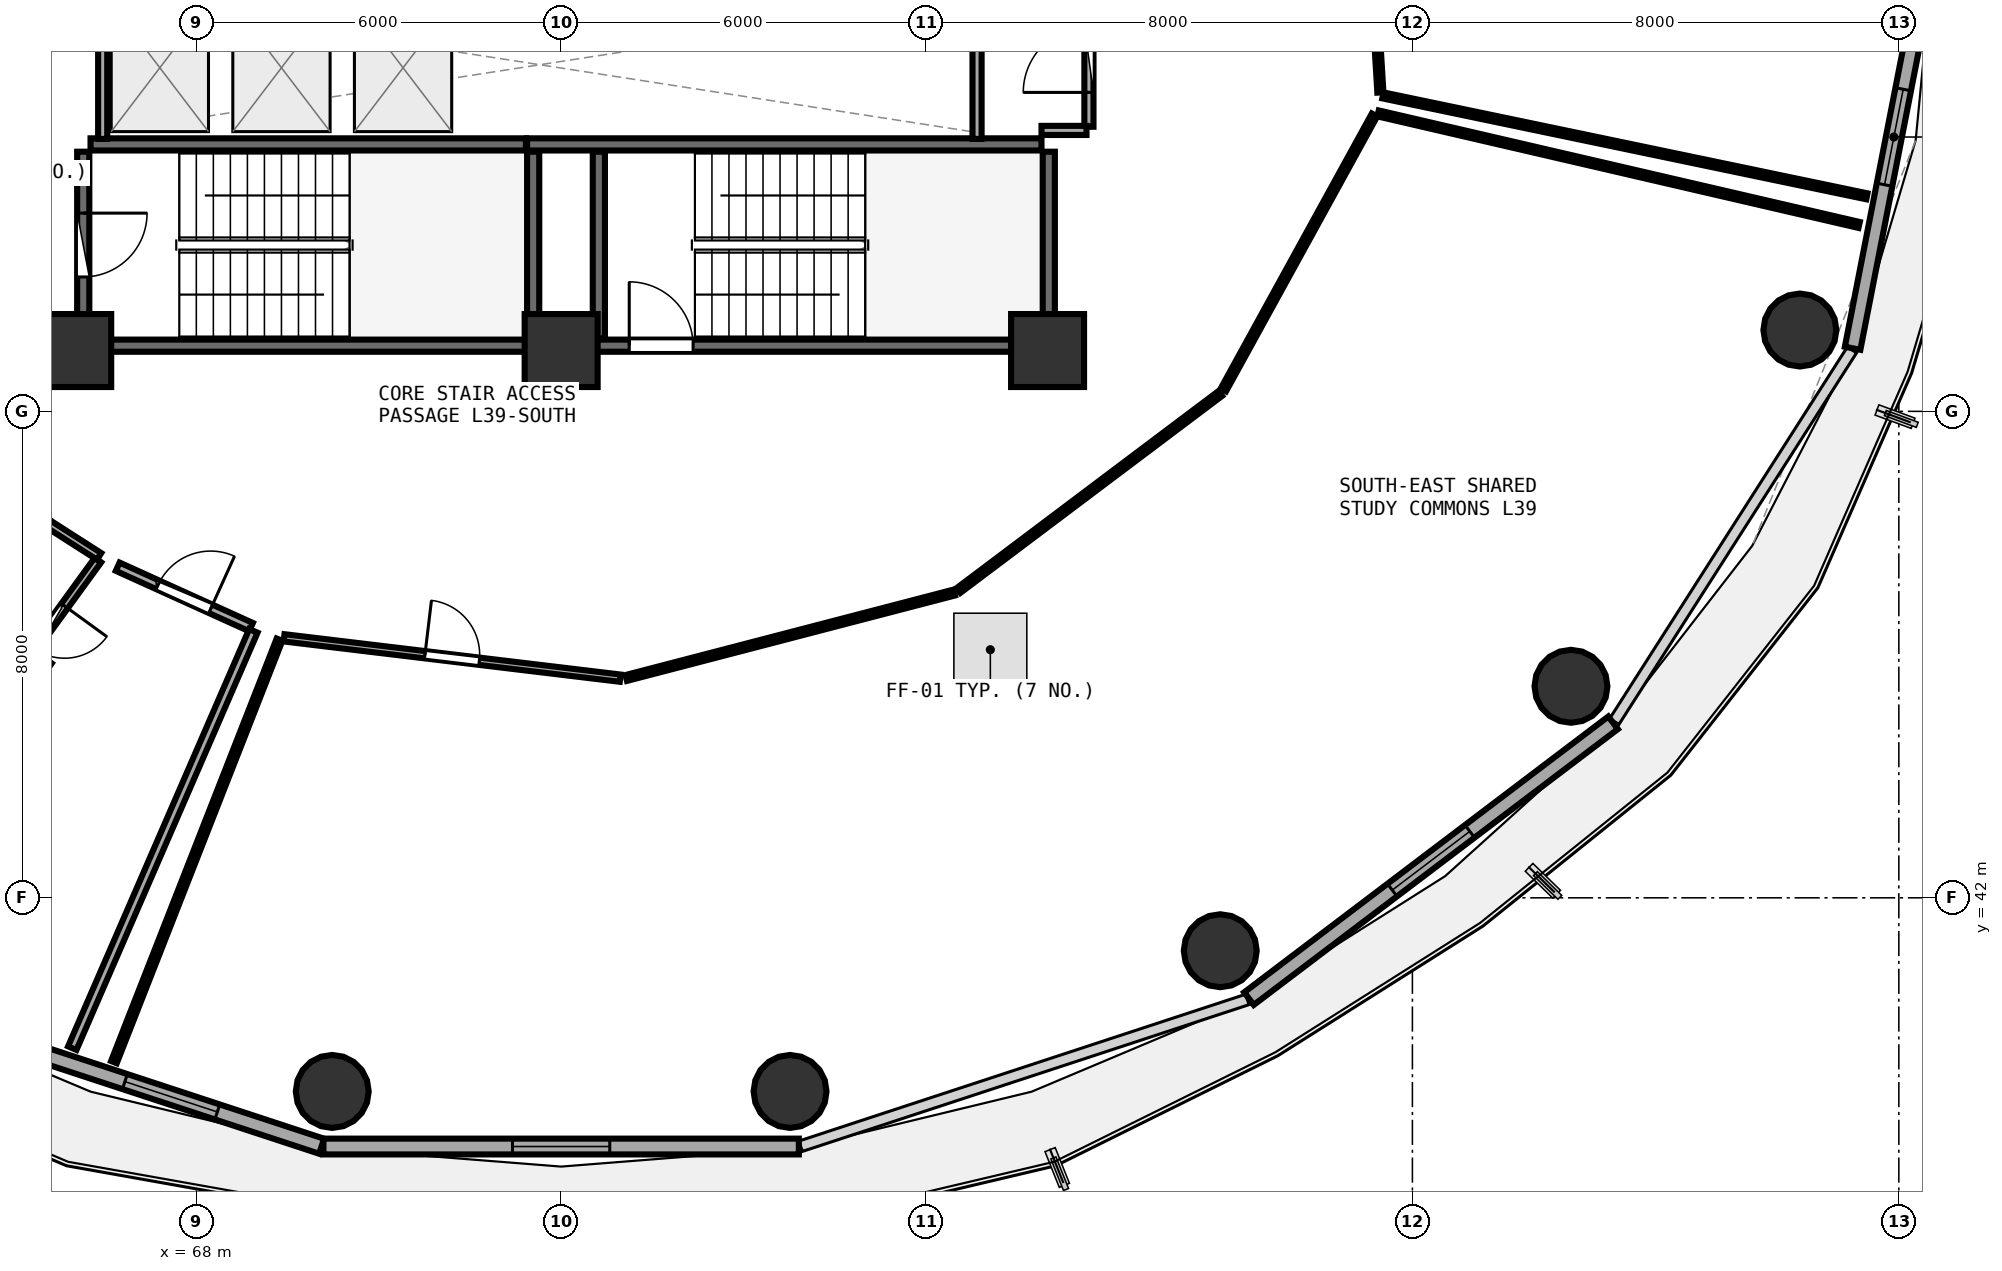
"""IFC4 building model, lengths in metres.
Left out: names, types, materials, properties, quantities, classifications, styles, units other than length and angle.
Written with IfcOpenShell. Run it as: python <this file> out.ifc"""

import sys

from ifc_helpers import new_model, si_unit, direction, frame, frame_2d, origin, origin_2d, place, context, subcontext, project, spatial, rectangle, circle, extrude, element, fill, save


model = new_model("IFC4")
c1 = context("Model", 3, precision=1e-05, world=origin(), true_north=direction((0.0, 1.0)))
c2 = subcontext(c1, "Body", "Model", "MODEL_VIEW")
j1 = project(units=[si_unit("LENGTHUNIT", "METRE"), si_unit("PLANEANGLEUNIT", "RADIAN")], contexts=[c1])
p1 = place(None, origin())
s1 = spatial("IfcSite", under=j1, at=p1, CompositionType="ELEMENT")
p2 = place(p1, origin())
s2 = spatial("IfcBuilding", under=s1, at=p2, CompositionType="ELEMENT")
p3 = place(p2, frame((0.0, 0.0, 154.35)))
s3 = spatial("IfcBuildingStorey", under=s2, at=p3, CompositionType="ELEMENT", Elevation=154.35)
for number, where, z_axis, x_axis in (
    (1, (66.0, 51.0, 0.0), (0.0, 0.0, 1.0), (1.0, 0.0, 0.0)),
    (2, (74.0, 51.0, 0.0), (0.0, 0.0, 1.0), (1.0, 0.0, 0.0)),
    (3, (82.0, 51.0, 0.0), (0.0, 0.0, 1.0), (1.0, 0.0, 0.0)),
):
    element("IfcColumn", number, at=place(p3, frame(where, z_axis=z_axis, x_axis=x_axis)), inside=s3, PredefinedType="PILASTER", context=c2, shape_type="SweptSolid", body=[
        extrude(rectangle(XDim=1.2, YDim=1.2, at=origin_2d()), origin(), (0.0, 0.0, 1.0), 3.75),
    ])
for number, where, z_axis, x_axis in (
    (4, (70.235, 38.816, 0.0), (0.0, 0.0, 1.0), (1.0, 0.0, 0.0)),
    (5, (77.765, 38.816, 0.0), (0.0, 0.0, 1.0), (1.0, 0.0, 0.0)),
    (6, (84.84, 41.13, 0.0), (0.0, 0.0, 1.0), (1.0, 0.0, 0.0)),
    (7, (90.608, 45.479, 0.0), (0.0, 0.0, 1.0), (1.0, 0.0, 0.0)),
    (8, (94.373, 51.337, 0.0), (0.0, 0.0, 1.0), (1.0, 0.0, 0.0)),
):
    element("IfcColumn", number, at=place(p3, frame(where, z_axis=z_axis, x_axis=x_axis)), inside=s3, PredefinedType="COLUMN", context=c2, shape_type="SweptSolid", body=[
        extrude(circle(Radius=0.6, at=origin_2d()), origin(), (0.0, 0.0, 1.0), 3.75),
    ])
p4 = place(p3, frame((62.714, 40.328, 0.0), z_axis=(0.0, 0.0, 1.0), x_axis=(0.950038302428, -0.312133343173, 0.0)))
e9 = element("IfcWall", 9, at=p4, inside=s3, PredefinedType="SOLIDWALL", context=c2, shape_type="SweptSolid", body=[
    extrude(rectangle(XDim=7.733, YDim=0.26, at=frame_2d((3.867, 0.0))), origin(), (0.0, 0.0, 1.0), 3.475),
])
p5 = place(p4, frame((4.327, 0.0, 0.85)))
e10 = element("IfcOpeningElement", 10, at=p5, cuts=e9, PredefinedType="OPENING", context=c2, shape_type="SweptSolid", body=[
    extrude(rectangle(XDim=1.6, YDim=1.45, at=frame_2d((0.8, 0.725))), frame((0.0, 0.14, 0.0), z_axis=(0.0, -1.0, 0.0), x_axis=(1.0, 0.0, 0.0)), (0.0, 0.0, 1.0), 0.28),
])
p6 = place(p3, frame((70.091, 37.91, 0.0), z_axis=(0.0, 0.0, 1.0), x_axis=(1.0, 0.0, 0.0)))
e11 = element("IfcWall", 11, at=p6, inside=s3, PredefinedType="SOLIDWALL", context=c2, shape_type="SweptSolid", body=[
    extrude(rectangle(XDim=7.819, YDim=0.26, at=frame_2d((3.909, 0.0))), origin(), (0.0, 0.0, 1.0), 3.475),
])
p7 = place(p6, frame((3.109, 0.0, 0.85)))
e12 = element("IfcOpeningElement", 12, at=p7, cuts=e11, PredefinedType="OPENING", context=c2, shape_type="SweptSolid", body=[
    extrude(rectangle(XDim=1.6, YDim=1.45, at=frame_2d((0.8, 0.725))), frame((0.0, 0.14, 0.0), z_axis=(0.0, -1.0, 0.0), x_axis=(1.0, 0.0, 0.0)), (0.0, 0.0, 1.0), 0.28),
])
p8 = place(p3, frame((85.312, 40.342, 0.0), z_axis=(0.0, 0.0, 1.0), x_axis=(0.797163719609, 0.603763202042, 0.0)))
e13 = element("IfcWall", 13, at=p8, inside=s3, PredefinedType="SOLIDWALL", context=c2, shape_type="SweptSolid", body=[
    extrude(rectangle(XDim=7.512, YDim=0.26, at=frame_2d((3.756, 0.0))), origin(), (0.0, 0.0, 1.0), 3.475),
])
p9 = place(p8, frame((2.956, 0.0, 0.85)))
e14 = element("IfcOpeningElement", 14, at=p9, cuts=e13, PredefinedType="OPENING", context=c2, shape_type="SweptSolid", body=[
    extrude(rectangle(XDim=1.6, YDim=1.45, at=frame_2d((0.8, 0.725))), frame((0.0, 0.14, 0.0), z_axis=(0.0, -1.0, 0.0), x_axis=(1.0, 0.0, 0.0)), (0.0, 0.0, 1.0), 0.28),
])
p10 = place(p3, frame((95.24, 51.038, 0.0), z_axis=(0.0, 0.0, 1.0), x_axis=(0.191716984769, 0.981450252306, 0.0)))
e15 = element("IfcWall", 15, at=p10, inside=s3, PredefinedType="SOLIDWALL", context=c2, shape_type="SweptSolid", body=[
    extrude(rectangle(XDim=7.079, YDim=0.26, at=frame_2d((3.54, 0.0))), origin(), (0.0, 0.0, 1.0), 3.475),
])
p11 = place(p10, frame((2.74, 0.0, 0.85)))
e16 = element("IfcOpeningElement", 16, at=p11, cuts=e15, PredefinedType="OPENING", context=c2, shape_type="SweptSolid", body=[
    extrude(rectangle(XDim=1.6, YDim=1.45, at=frame_2d((0.8, 0.725))), frame((0.0, 0.14, 0.0), z_axis=(0.0, -1.0, 0.0), x_axis=(1.0, 0.0, 0.0)), (0.0, 0.0, 1.0), 0.28),
])
p12 = place(p3, frame((74.0, 51.08, 0.0), z_axis=(0.0, 0.0, 1.0), x_axis=(1.0, 0.0, 0.0)))
e17 = element("IfcWall", 17, at=p12, inside=s3, PredefinedType="SHEAR", context=c2, shape_type="SweptSolid", body=[
    extrude(rectangle(XDim=7.9, YDim=0.2, at=frame_2d((3.95, 0.0))), origin(), (0.0, 0.0, 1.0), 3.49),
])
p13 = place(p12, frame((1.12, 0.0, 0.0)))
e18 = element("IfcOpeningElement", 18, at=p13, cuts=e17, PredefinedType="OPENING", context=c2, shape_type="SweptSolid", body=[
    extrude(rectangle(XDim=1.05, YDim=2.1, at=frame_2d((0.525, 1.05))), frame((0.0, 0.11, 0.0), z_axis=(0.0, -1.0, 0.0), x_axis=(1.0, 0.0, 0.0)), (0.0, 0.0, 1.0), 0.22),
])
p14 = place(p3, frame((82.02, 51.2, 0.0), z_axis=(0.0, 0.0, 1.0), x_axis=(0.0, 1.0, 0.0)))
e19 = element("IfcWall", 19, at=p14, inside=s3, PredefinedType="SHEAR", context=c2, shape_type="SweptSolid", body=[
    extrude(rectangle(XDim=3.07, YDim=0.2, at=frame_2d((1.535, 0.0))), origin(), (0.0, 0.0, 1.0), 3.49),
])
p15 = place(p3, frame((81.9, 54.39, 0.0), z_axis=(0.0, 0.0, 1.0), x_axis=(-1.0, 0.0, 0.0)))
e20 = element("IfcWall", 20, at=p15, inside=s3, PredefinedType="SHEAR", context=c2, shape_type="SweptSolid", body=[
    extrude(rectangle(XDim=8.46, YDim=0.2, at=frame_2d((4.23, 0.0))), origin(), (0.0, 0.0, 1.0), 3.49),
])
p16 = place(p3, frame((74.62, 54.27, 0.0), z_axis=(0.0, 0.0, 1.0), x_axis=(0.0, -1.0, 0.0)))
e21 = element("IfcWall", 21, at=p16, inside=s3, PredefinedType="SHEAR", context=c2, shape_type="SweptSolid", body=[
    extrude(rectangle(XDim=3.07, YDim=0.2, at=frame_2d((1.535, 0.0))), origin(), (0.0, 0.0, 1.0), 3.49),
])
p17 = place(p3, frame((66.26, 51.08, 0.0), z_axis=(0.0, 0.0, 1.0), x_axis=(1.0, 0.0, 0.0)))
e22 = element("IfcWall", 22, at=p17, inside=s3, PredefinedType="SHEAR", context=c2, shape_type="SweptSolid", body=[
    extrude(rectangle(XDim=7.16, YDim=0.2, at=frame_2d((3.58, 0.0))), origin(), (0.0, 0.0, 1.0), 3.49),
])
p18 = place(p3, frame((73.54, 51.2, 0.0), z_axis=(0.0, 0.0, 1.0), x_axis=(0.0, 1.0, 0.0)))
e23 = element("IfcWall", 23, at=p18, inside=s3, PredefinedType="SHEAR", context=c2, shape_type="SweptSolid", body=[
    extrude(rectangle(XDim=3.07, YDim=0.2, at=frame_2d((1.535, 0.0))), origin(), (0.0, 0.0, 1.0), 3.49),
])
p19 = place(p3, frame((73.42, 54.39, 0.0), z_axis=(0.0, 0.0, 1.0), x_axis=(-1.0, 0.0, 0.0)))
e24 = element("IfcWall", 24, at=p19, inside=s3, PredefinedType="SHEAR", context=c2, shape_type="SweptSolid", body=[
    extrude(rectangle(XDim=7.16, YDim=0.2, at=frame_2d((3.58, 0.0))), origin(), (0.0, 0.0, 1.0), 3.49),
])
p20 = place(p3, frame((66.14, 54.27, 0.0), z_axis=(0.0, 0.0, 1.0), x_axis=(0.0, -1.0, 0.0)))
e25 = element("IfcWall", 25, at=p20, inside=s3, PredefinedType="SHEAR", context=c2, shape_type="SweptSolid", body=[
    extrude(rectangle(XDim=3.07, YDim=0.2, at=frame_2d((1.535, 0.0))), origin(), (0.0, 0.0, 1.0), 3.49),
])
p21 = place(p20, frame((1.01, 0.0, 0.0)))
e26 = element("IfcOpeningElement", 26, at=p21, cuts=e25, PredefinedType="OPENING", context=c2, shape_type="SweptSolid", body=[
    extrude(rectangle(XDim=1.05, YDim=2.1, at=frame_2d((0.525, 1.05))), frame((0.0, 0.11, 0.0), z_axis=(0.0, -1.0, 0.0), x_axis=(1.0, 0.0, 0.0)), (0.0, 0.0, 1.0), 0.22),
])
for number, where, z_axis, x_axis in (
    (27, (66.46, 54.48, 0.0), (0.0, 0.0, 1.0), (0.0, 1.0, 0.0)),
    (28, (80.84, 54.48, 0.0), (0.0, 0.0, 1.0), (0.0, 1.0, 0.0)),
):
    element("IfcWall", number, at=place(p3, frame(where, z_axis=z_axis, x_axis=x_axis)), inside=s3, PredefinedType="PARTITIONING", context=c2, shape_type="SweptSolid", body=[
        extrude(rectangle(XDim=2.29, YDim=0.15, at=frame_2d((1.145, 0.0))), origin(), (0.0, 0.0, 1.0), 3.48),
    ])
p22 = place(p3, frame((82.68, 54.68, 0.0), z_axis=(0.0, 0.0, 1.0), x_axis=(0.0, 1.0, 0.0)))
e29 = element("IfcWall", 29, at=p22, inside=s3, PredefinedType="PARTITIONING", context=c2, shape_type="SweptSolid", body=[
    extrude(rectangle(XDim=2.21, YDim=0.15, at=frame_2d((1.105, 0.0))), origin(), (0.0, 0.0, 1.0), 3.48),
])
p23 = place(p22, frame((0.565, 0.0, 0.0)))
e30 = element("IfcOpeningElement", 30, at=p23, cuts=e29, PredefinedType="OPENING", context=c2, shape_type="SweptSolid", body=[
    extrude(rectangle(XDim=1.08, YDim=2.1, at=frame_2d((0.54, 1.05))), frame((0.0, 0.085, 0.0), z_axis=(0.0, -1.0, 0.0), x_axis=(1.0, 0.0, 0.0)), (0.0, 0.0, 1.0), 0.17),
])
p24 = place(p3, frame((69.443, 46.276, 0.0), z_axis=(0.0, 0.0, 1.0), x_axis=(0.992874348748, -0.119165966612, 0.0)))
e31 = element("IfcWall", 31, at=p24, inside=s3, PredefinedType="PARTITIONING", context=c2, shape_type="SweptSolid", body=[
    extrude(rectangle(XDim=5.569, YDim=0.12, at=frame_2d((2.784, 0.0))), origin(), (0.0, 0.0, 1.0), 2.975),
])
p25 = place(p24, frame((2.334, 0.0, 0.0)))
e32 = element("IfcOpeningElement", 32, at=p25, cuts=e31, PredefinedType="OPENING", context=c2, shape_type="SweptSolid", body=[
    extrude(rectangle(XDim=0.9, YDim=2.08, at=frame_2d((0.45, 1.04))), frame((0.0, 0.07, 0.0), z_axis=(0.0, -1.0, 0.0), x_axis=(1.0, 0.0, 0.0)), (0.0, 0.0, 1.0), 0.14),
])
p26 = place(p3, frame((66.383, 47.555, 0.0), z_axis=(0.0, 0.0, 1.0), x_axis=(-0.588001344837, -0.808859949849, 0.0)))
e33 = element("IfcWall", 33, at=p26, inside=s3, PredefinedType="PLUMBINGWALL", context=c2, shape_type="SweptSolid", body=[
    extrude(rectangle(XDim=2.727, YDim=0.13, at=frame_2d((1.364, 0.0))), origin(), (0.0, 0.0, 1.0), 3.235),
])
p27 = place(p26, frame((0.934, 0.0, 0.0)))
e34 = element("IfcOpeningElement", 34, at=p27, cuts=e33, PredefinedType="OPENING", context=c2, shape_type="SweptSolid", body=[
    extrude(rectangle(XDim=0.86, YDim=2.05, at=frame_2d((0.43, 1.025))), frame((0.0, 0.075, 0.0), z_axis=(0.0, -1.0, 0.0), x_axis=(1.0, 0.0, 0.0)), (0.0, 0.0, 1.0), 0.15),
])
p28 = place(p3, frame((66.707, 47.445, 0.0), z_axis=(0.0, 0.0, 1.0), x_axis=(0.910872904928, -0.412686989216, 0.0)))
e35 = element("IfcWall", 35, at=p28, inside=s3, PredefinedType="PARTITIONING", context=c2, shape_type="SweptSolid", body=[
    extrude(rectangle(XDim=2.407, YDim=0.15, at=frame_2d((1.204, 0.0))), origin(), (0.0, 0.0, 1.0), 3.235),
])
p29 = place(p28, frame((0.729, 0.0, 0.0)))
e36 = element("IfcOpeningElement", 36, at=p29, cuts=e35, PredefinedType="OPENING", context=c2, shape_type="SweptSolid", body=[
    extrude(rectangle(XDim=0.95, YDim=2.08, at=frame_2d((0.475, 1.04))), frame((0.0, 0.085, 0.0), z_axis=(0.0, -1.0, 0.0), x_axis=(1.0, 0.0, 0.0)), (0.0, 0.0, 1.0), 0.17),
])
p30 = place(p3, frame((81.9, 54.62, 0.0), z_axis=(0.0, 0.0, 1.0), x_axis=(1.0, 0.0, 0.0)))
e37 = element("IfcWall", 37, at=p30, inside=s3, PredefinedType="PARTITIONING", context=c2, shape_type="SweptSolid", body=[
    extrude(rectangle(XDim=0.74, YDim=0.15, at=frame_2d((0.37, 0.0))), origin(), (0.0, 0.0, 1.0), 2.775),
])
p31 = place(p3, frame((75.07, 45.615, 0.0), z_axis=(0.0, 0.0, 1.0), x_axis=(0.967718115259, 0.252035016216, 0.0)))
e38 = element("IfcWall", 38, at=p31, inside=s3, PredefinedType="PARTITIONING", context=c2, shape_type="SweptSolid", body=[
    extrude(rectangle(XDim=5.575, YDim=0.1, at=frame_2d((2.787, 0.0))), origin(), (0.0, 0.0, 1.0), 2.975),
])
p32 = place(p3, frame((80.535, 47.054, 0.0), z_axis=(0.0, 0.0, 1.0), x_axis=(0.799096406603, 0.601202904979, 0.0)))
e39 = element("IfcWall", 39, at=p32, inside=s3, PredefinedType="PARTITIONING", context=c2, shape_type="SweptSolid", body=[
    extrude(rectangle(XDim=5.387, YDim=0.1, at=frame_2d((2.694, 0.0))), origin(), (0.0, 0.0, 1.0), 2.975),
])
p33 = place(p3, frame((84.891, 50.352, 0.0), z_axis=(0.0, 0.0, 1.0), x_axis=(0.481680787808, 0.876346745676, 0.0)))
e40 = element("IfcWall", 40, at=p33, inside=s3, PredefinedType="PARTITIONING", context=c2, shape_type="SweptSolid", body=[
    extrude(rectangle(XDim=5.16, YDim=0.1, at=frame_2d((2.58, 0.0))), origin(), (0.0, 0.0, 1.0), 2.975),
])
p34 = place(p3, frame((87.435, 54.9, 0.0), z_axis=(0.0, 0.0, 1.0), x_axis=(0.97414388338, -0.225928516292, 0.0)))
e41 = element("IfcWall", 41, at=p34, inside=s3, PredefinedType="PARTITIONING", context=c2, shape_type="SweptSolid", body=[
    extrude(rectangle(XDim=8.122, YDim=0.1, at=frame_2d((4.061, 0.0))), origin(), (0.0, 0.0, 1.0), 3.025),
])
p35 = place(p3, frame((66.645, 39.297, 0.0), z_axis=(0.0, 0.0, 1.0), x_axis=(0.364957999702, 0.931023983823, 0.0)))
e42 = element("IfcWall", 42, at=p35, inside=s3, PredefinedType="PARTITIONING", context=c2, shape_type="SweptSolid", body=[
    extrude(rectangle(XDim=7.464, YDim=0.1, at=frame_2d((3.732, 0.0))), origin(), (0.0, 0.0, 1.0), 3.025),
])
p36 = place(p3, frame((87.474, 55.244, 0.0), z_axis=(0.0, 0.0, 1.0), x_axis=(-0.060688331813, 0.998156764432, 0.0)))
e43 = element("IfcWall", 43, at=p36, inside=s3, PredefinedType="PARTITIONING", context=c2, shape_type="SweptSolid", body=[
    extrude(rectangle(XDim=6.827, YDim=0.1, at=frame_2d((3.414, 0.0))), origin(), (0.0, 0.0, 1.0), 2.975),
])
p37 = place(p3, frame((95.475, 53.536, 0.0), z_axis=(0.0, 0.0, 1.0), x_axis=(-0.978946183013, 0.204118521367, 0.0)))
e44 = element("IfcWall", 44, at=p37, inside=s3, PredefinedType="PARTITIONING", context=c2, shape_type="SweptSolid", body=[
    extrude(rectangle(XDim=8.131, YDim=0.1, at=frame_2d((4.065, 0.0))), origin(), (0.0, 0.0, 1.0), 3.025),
])
p38 = place(p3, frame((65.573, 48.145, 0.0), z_axis=(0.0, 0.0, 1.0), x_axis=(0.842104586495, -0.539314254776, 0.0)))
e45 = element("IfcWall", 45, at=p38, inside=s3, PredefinedType="PLUMBINGWALL", context=c2, shape_type="SweptSolid", body=[
    extrude(rectangle(XDim=0.984, YDim=0.13, at=frame_2d((0.492, 0.0))), origin(), (0.0, 0.0, 1.0), 3.48),
])
p39 = place(p3, frame((68.938, 46.39, 0.0), z_axis=(0.0, 0.0, 1.0), x_axis=(-0.398074464123, -0.917353105959, 0.0)))
e46 = element("IfcWall", 46, at=p39, inside=s3, PredefinedType="PARTITIONING", context=c2, shape_type="SweptSolid", body=[
    extrude(rectangle(XDim=7.481, YDim=0.15, at=frame_2d((3.741, 0.0))), origin(), (0.0, 0.0, 1.0), 3.025),
])
p40 = place(p5, origin())
e47 = element("IfcWindow", 47, at=p40, inside=s3, PartitioningType="SINGLE_PANEL", PredefinedType="WINDOW", context=c2, shape_type="SweptSolid", body=[
    extrude(rectangle(XDim=1.6, YDim=1.45, at=frame_2d((0.8, 0.725))), frame((0.0, 0.03, 0.0), z_axis=(0.0, -1.0, 0.0), x_axis=(1.0, 0.0, 0.0)), (0.0, 0.0, 1.0), 0.06),
])
fill(e10, e47)
p41 = place(p7, origin())
e48 = element("IfcWindow", 48, at=p41, inside=s3, PartitioningType="SINGLE_PANEL", PredefinedType="WINDOW", context=c2, shape_type="SweptSolid", body=[
    extrude(rectangle(XDim=1.6, YDim=1.45, at=frame_2d((0.8, 0.725))), frame((0.0, 0.03, 0.0), z_axis=(0.0, -1.0, 0.0), x_axis=(1.0, 0.0, 0.0)), (0.0, 0.0, 1.0), 0.06),
])
fill(e12, e48)
p42 = place(p9, origin())
e49 = element("IfcWindow", 49, at=p42, inside=s3, PartitioningType="SINGLE_PANEL", PredefinedType="WINDOW", context=c2, shape_type="SweptSolid", body=[
    extrude(rectangle(XDim=1.6, YDim=1.45, at=frame_2d((0.8, 0.725))), frame((0.0, 0.03, 0.0), z_axis=(0.0, -1.0, 0.0), x_axis=(1.0, 0.0, 0.0)), (0.0, 0.0, 1.0), 0.06),
])
fill(e14, e49)
p43 = place(p11, origin())
e50 = element("IfcWindow", 50, at=p43, inside=s3, PartitioningType="SINGLE_PANEL", PredefinedType="WINDOW", context=c2, shape_type="SweptSolid", body=[
    extrude(rectangle(XDim=1.6, YDim=1.45, at=frame_2d((0.8, 0.725))), frame((0.0, 0.03, 0.0), z_axis=(0.0, -1.0, 0.0), x_axis=(1.0, 0.0, 0.0)), (0.0, 0.0, 1.0), 0.06),
])
fill(e16, e50)
p44 = place(p13, origin())
e51 = element("IfcDoor", 51, at=p44, inside=s3, OperationType="SINGLE_SWING_LEFT", PredefinedType="DOOR", context=c2, shape_type="SweptSolid", body=[
    extrude(rectangle(XDim=1.05, YDim=2.1, at=frame_2d((0.525, 1.05))), frame((0.0, 0.025, 0.0), z_axis=(0.0, -1.0, 0.0), x_axis=(1.0, 0.0, 0.0)), (0.0, 0.0, 1.0), 0.05),
])
fill(e18, e51)
p45 = place(p21, origin())
e52 = element("IfcDoor", 52, at=p45, inside=s3, OperationType="SINGLE_SWING_LEFT", PredefinedType="DOOR", context=c2, shape_type="SweptSolid", body=[
    extrude(rectangle(XDim=1.05, YDim=2.1, at=frame_2d((0.525, 1.05))), frame((0.0, 0.025, 0.0), z_axis=(0.0, -1.0, 0.0), x_axis=(1.0, 0.0, 0.0)), (0.0, 0.0, 1.0), 0.05),
])
fill(e26, e52)
p46 = place(p23, origin())
e53 = element("IfcDoor", 53, at=p46, inside=s3, OperationType="SINGLE_SWING_LEFT", PredefinedType="DOOR", context=c2, shape_type="SweptSolid", body=[
    extrude(rectangle(XDim=1.08, YDim=2.1, at=frame_2d((0.54, 1.05))), frame((0.0, 0.025, 0.0), z_axis=(0.0, -1.0, 0.0), x_axis=(1.0, 0.0, 0.0)), (0.0, 0.0, 1.0), 0.05),
])
fill(e30, e53)
p47 = place(p25, origin())
e54 = element("IfcDoor", 54, at=p47, inside=s3, OperationType="SINGLE_SWING_LEFT", PredefinedType="DOOR", context=c2, shape_type="SweptSolid", body=[
    extrude(rectangle(XDim=0.9, YDim=2.08, at=frame_2d((0.45, 1.04))), frame((0.0, 0.025, 0.0), z_axis=(0.0, -1.0, 0.0), x_axis=(1.0, 0.0, 0.0)), (0.0, 0.0, 1.0), 0.05),
])
fill(e32, e54)
p48 = place(p27, origin())
e55 = element("IfcDoor", 55, at=p48, inside=s3, OperationType="SINGLE_SWING_LEFT", PredefinedType="DOOR", context=c2, shape_type="SweptSolid", body=[
    extrude(rectangle(XDim=0.86, YDim=2.05, at=frame_2d((0.43, 1.025))), frame((0.0, 0.025, 0.0), z_axis=(0.0, -1.0, 0.0), x_axis=(1.0, 0.0, 0.0)), (0.0, 0.0, 1.0), 0.05),
])
fill(e34, e55)
p49 = place(p29, origin())
e56 = element("IfcDoor", 56, at=p49, inside=s3, OperationType="SINGLE_SWING_RIGHT", PredefinedType="DOOR", context=c2, shape_type="SweptSolid", body=[
    extrude(rectangle(XDim=0.95, YDim=2.08, at=frame_2d((0.475, 1.04))), frame((0.0, 0.025, 0.0), z_axis=(0.0, -1.0, 0.0), x_axis=(1.0, 0.0, 0.0)), (0.0, 0.0, 1.0), 0.05),
])
fill(e36, e56)
save(model, sys.argv[1])
